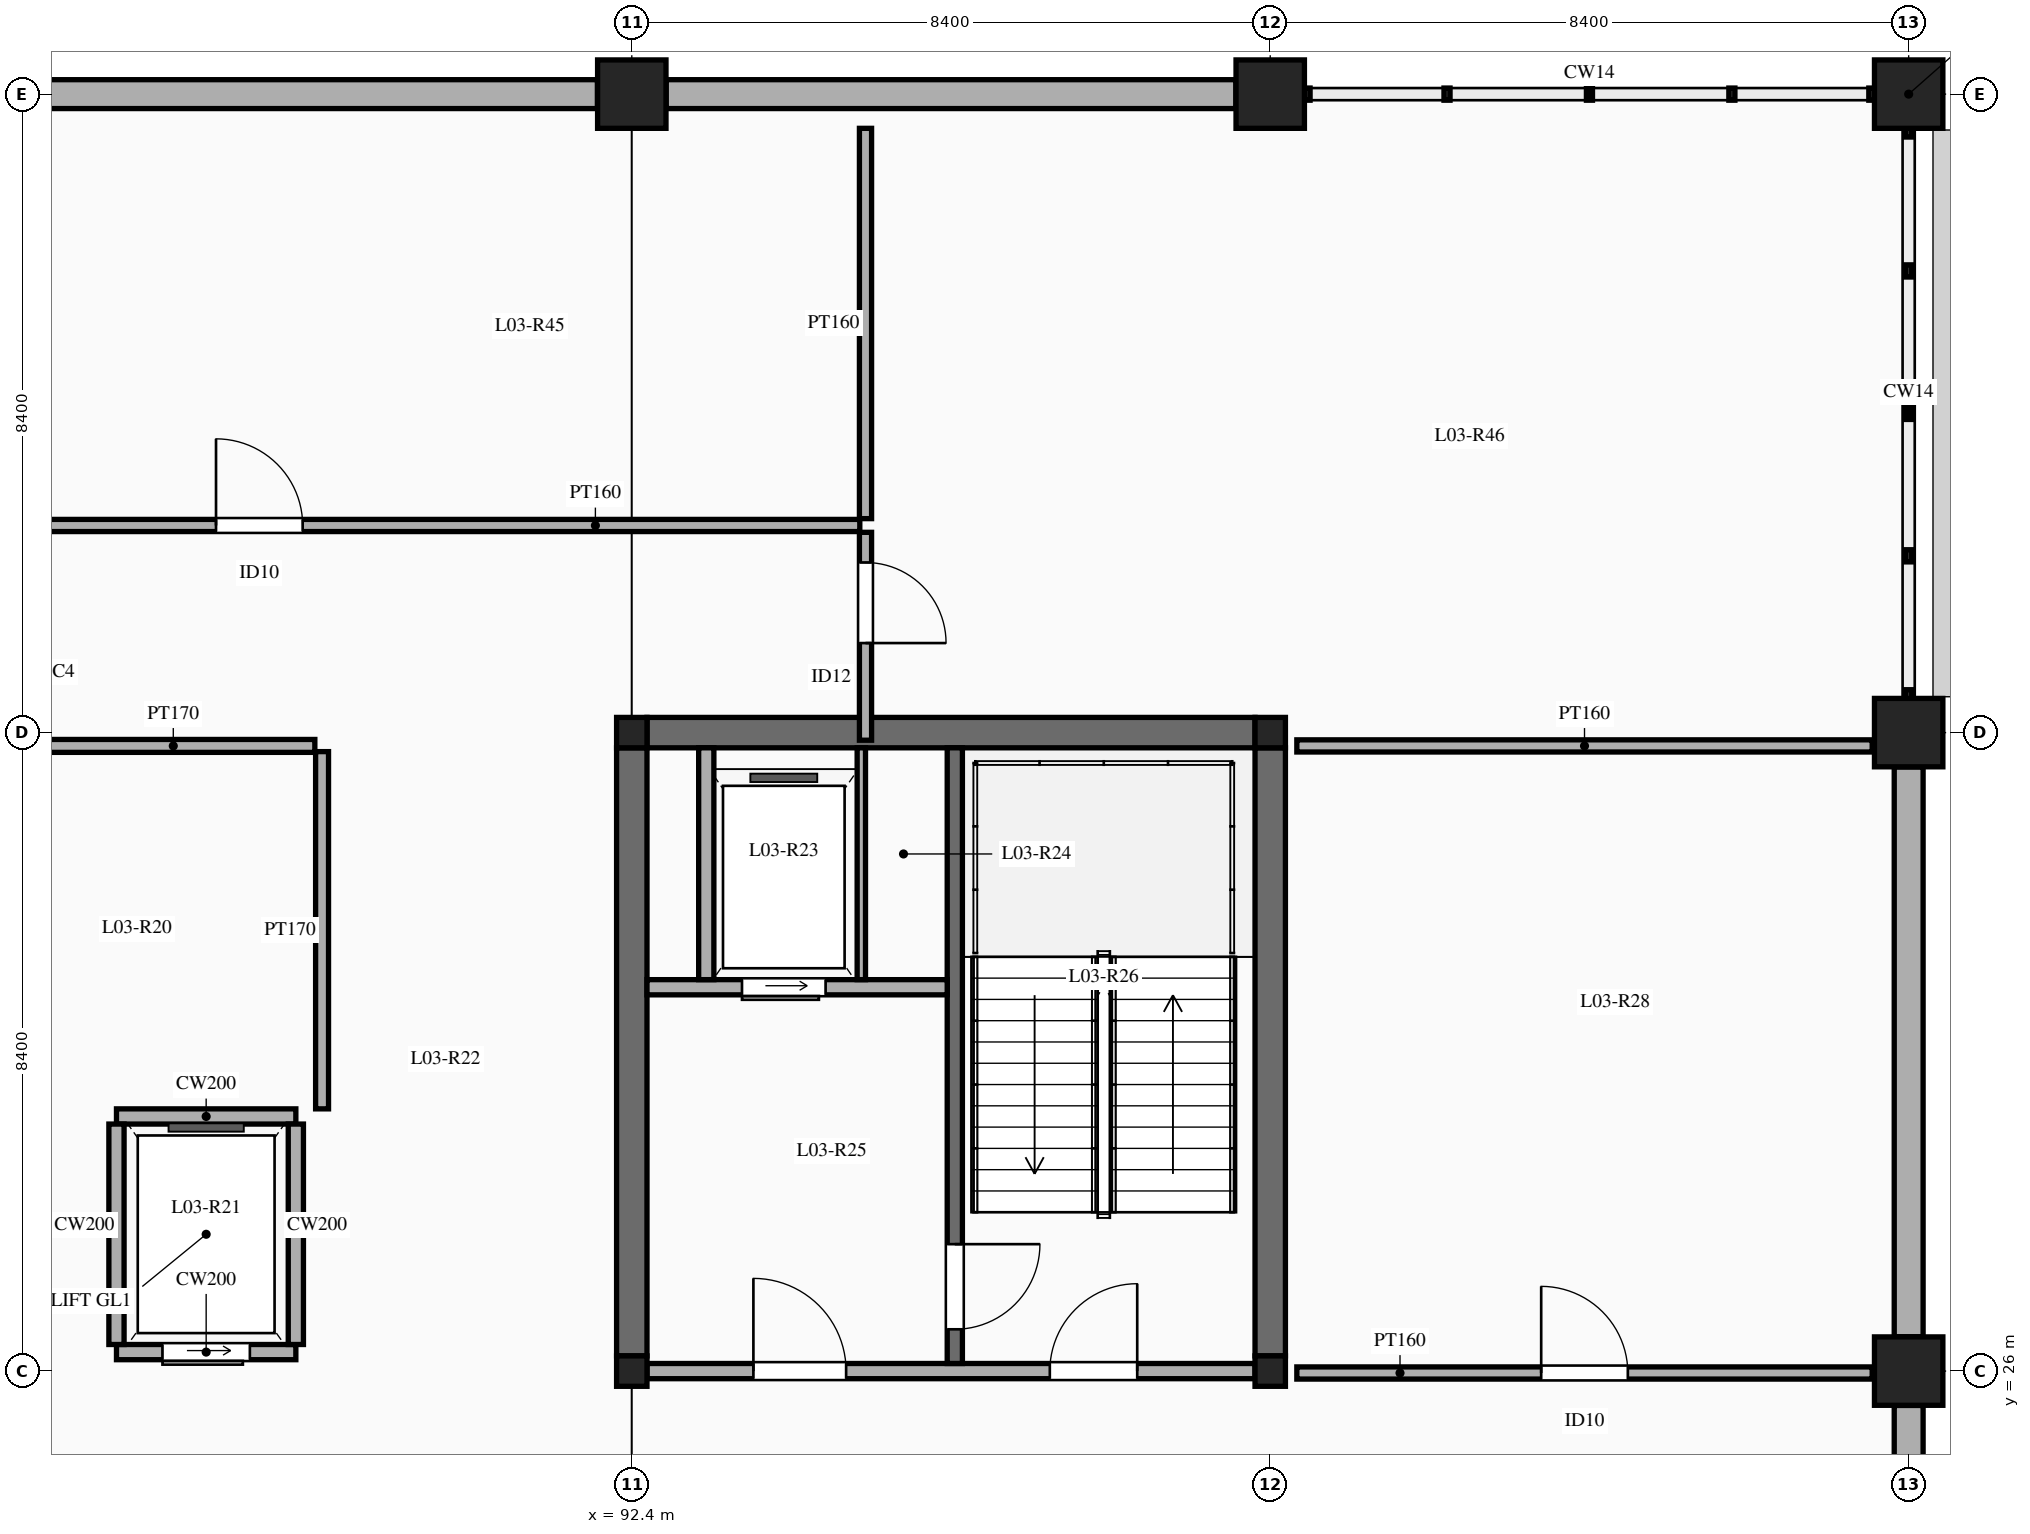
"""IFC4 building model, lengths in metres.
Left out: names, types, materials, properties, quantities, classifications, styles, units other than length and angle.
Written with IfcOpenShell. Run it as: python <this file> out.ifc"""

import sys

from ifc_helpers import new_model, si_unit, direction, frame, frame_2d, origin, origin_2d, place, context, subcontext, project, spatial, rectangle, extrude, element, fill, save


model = new_model("IFC4")
c1 = context("Model", 3, precision=1e-05, world=origin(), true_north=direction((0.0, 1.0)))
c2 = subcontext(c1, "Body", "Model", "MODEL_VIEW")
j1 = project(units=[si_unit("LENGTHUNIT", "METRE"), si_unit("PLANEANGLEUNIT", "RADIAN")], contexts=[c1])
p1 = place(None, origin())
s1 = spatial("IfcSite", under=j1, at=p1, CompositionType="ELEMENT")
p2 = place(p1, origin())
s2 = spatial("IfcBuilding", under=s1, at=p2, CompositionType="ELEMENT")
p3 = place(p2, frame((0.0, 0.0, 15.0)))
s3 = spatial("IfcBuildingStorey", under=s2, at=p3, CompositionType="ELEMENT", Elevation=15.0)
for number, where, z_axis, x_axis in (
    (1, (92.4, 26.0, 0.0), (0.0, 0.0, 1.0), (1.0, 0.0, 0.0)),
    (2, (92.4, 34.4, 0.0), (0.0, 0.0, 1.0), (1.0, 0.0, 0.0)),
):
    element("IfcColumn", number, at=place(p3, frame(where, z_axis=z_axis, x_axis=x_axis)), inside=s3, PredefinedType="COLUMN", context=c2, shape_type="SweptSolid", body=[
        extrude(rectangle(XDim=0.4, YDim=0.4, at=origin_2d()), origin(), (0.0, 0.0, 1.0), 4.5),
    ])
p4 = place(p3, frame((92.4, 42.8, 0.0), z_axis=(0.0, 0.0, 1.0), x_axis=(1.0, 0.0, 0.0)))
e3 = element("IfcColumn", 3, at=p4, inside=s3, PredefinedType="COLUMN", context=c2, shape_type="SweptSolid", body=[
    extrude(rectangle(XDim=0.9, YDim=0.9, at=origin_2d()), origin(), (0.0, 0.0, 1.0), 4.5),
])
for number, where, z_axis, x_axis in (
    (4, (100.8, 26.0, 0.0), (0.0, 0.0, 1.0), (1.0, 0.0, 0.0)),
    (5, (100.8, 34.4, 0.0), (0.0, 0.0, 1.0), (1.0, 0.0, 0.0)),
):
    element("IfcColumn", number, at=place(p3, frame(where, z_axis=z_axis, x_axis=x_axis)), inside=s3, PredefinedType="COLUMN", context=c2, shape_type="SweptSolid", body=[
        extrude(rectangle(XDim=0.4, YDim=0.4, at=origin_2d()), origin(), (0.0, 0.0, 1.0), 4.5),
    ])
for number, where, z_axis, x_axis in (
    (6, (100.8, 42.8, 0.0), (0.0, 0.0, 1.0), (1.0, 0.0, 0.0)),
    (7, (109.2, 26.0, 0.0), (0.0, 0.0, 1.0), (1.0, 0.0, 0.0)),
    (8, (109.2, 34.4, 0.0), (0.0, 0.0, 1.0), (1.0, 0.0, 0.0)),
    (9, (109.2, 42.8, 0.0), (0.0, 0.0, 1.0), (1.0, 0.0, 0.0)),
):
    element("IfcColumn", number, at=place(p3, frame(where, z_axis=z_axis, x_axis=x_axis)), inside=s3, PredefinedType="COLUMN", context=c2, shape_type="SweptSolid", body=[
        extrude(rectangle(XDim=0.9, YDim=0.9, at=origin_2d()), origin(), (0.0, 0.0, 1.0), 4.5),
    ])
for number, where, z_axis, x_axis in (
    (10, (92.4, 26.2, 0.0), (0.0, 0.0, 1.0), (0.0, 1.0, 0.0)),
    (11, (100.8, 26.2, 0.0), (0.0, 0.0, 1.0), (0.0, 1.0, 0.0)),
    (12, (92.6, 34.4, 0.0), (0.0, 0.0, 1.0), (1.0, 0.0, 0.0)),
):
    element("IfcWall", number, at=place(p3, frame(where, z_axis=z_axis, x_axis=x_axis)), inside=s3, PredefinedType="SHEAR", context=c2, shape_type="SweptSolid", body=[
        extrude(rectangle(XDim=8.0, YDim=0.4, at=frame_2d((4.0, 0.0))), origin(), (0.0, 0.0, 1.0), 4.5),
    ])
p5 = place(p3, frame((84.452, 42.8, 0.0), z_axis=(0.0, 0.0, 1.0), x_axis=(1.0, 0.0, 0.0)))
e13 = element("IfcWall", 13, at=p5, inside=s3, PredefinedType="SOLIDWALL", context=c2, shape_type="SweptSolid", body=[
    extrude(rectangle(XDim=7.496, YDim=0.38, at=frame_2d((3.748, 0.0))), origin(), (0.0, 0.0, 1.0), 3.55),
])
p6 = place(p3, frame((92.852, 42.8, 0.0), z_axis=(0.0, 0.0, 1.0), x_axis=(1.0, 0.0, 0.0)))
e14 = element("IfcWall", 14, at=p6, inside=s3, PredefinedType="SOLIDWALL", context=c2, shape_type="SweptSolid", body=[
    extrude(rectangle(XDim=7.496, YDim=0.38, at=frame_2d((3.748, 0.0))), origin(), (0.0, 0.0, 1.0), 3.55),
])
for number, where, z_axis, x_axis in (
    (15, (109.2, 18.052, 0.0), (0.0, 0.0, 1.0), (0.0, 1.0, 0.0)),
    (16, (109.2, 26.452, 0.0), (0.0, 0.0, 1.0), (0.0, 1.0, 0.0)),
):
    element("IfcWall", number, at=place(p3, frame(where, z_axis=z_axis, x_axis=x_axis)), inside=s3, PredefinedType="SOLIDWALL", context=c2, shape_type="SweptSolid", body=[
        extrude(rectangle(XDim=7.496, YDim=0.38, at=frame_2d((3.748, 0.0))), origin(), (0.0, 0.0, 1.0), 3.55),
    ])
p7 = place(p3, frame((92.6, 26.0, 0.0), z_axis=(0.0, 0.0, 1.0), x_axis=(1.0, 0.0, 0.0)))
e17 = element("IfcWall", 17, at=p7, inside=s3, PredefinedType="SOLIDWALL", context=c2, shape_type="SweptSolid", body=[
    extrude(rectangle(XDim=8.0, YDim=0.2, at=frame_2d((4.0, 0.0))), origin(), (0.0, 0.0, 1.0), 3.48),
])
p8 = place(p7, frame((1.4, 0.0, 0.0)))
e18 = element("IfcOpeningElement", 18, at=p8, cuts=e17, PredefinedType="OPENING", context=c2, shape_type="SweptSolid", body=[
    extrude(rectangle(XDim=1.22, YDim=2.15, at=frame_2d((0.61, 1.075))), frame((0.0, 0.11, 0.0), z_axis=(0.0, -1.0, 0.0), x_axis=(1.0, 0.0, 0.0)), (0.0, 0.0, 1.0), 0.22),
])
p9 = place(p7, frame((5.3, 0.0, 0.0)))
e19 = element("IfcOpeningElement", 19, at=p9, cuts=e17, PredefinedType="OPENING", context=c2, shape_type="SweptSolid", body=[
    extrude(rectangle(XDim=1.15, YDim=2.15, at=frame_2d((0.575, 1.075))), frame((0.0, 0.11, 0.0), z_axis=(0.0, -1.0, 0.0), x_axis=(1.0, 0.0, 0.0)), (0.0, 0.0, 1.0), 0.22),
])
p10 = place(p3, frame((96.65, 26.1, 0.0), z_axis=(0.0, 0.0, 1.0), x_axis=(0.0, 1.0, 0.0)))
e20 = element("IfcWall", 20, at=p10, inside=s3, PredefinedType="SOLIDWALL", context=c2, shape_type="SweptSolid", body=[
    extrude(rectangle(XDim=8.1, YDim=0.2, at=frame_2d((4.05, 0.0))), origin(), (0.0, 0.0, 1.0), 4.25),
])
p11 = place(p10, frame((0.45, 0.0, 0.0)))
e21 = element("IfcOpeningElement", 21, at=p11, cuts=e20, PredefinedType="OPENING", context=c2, shape_type="SweptSolid", body=[
    extrude(rectangle(XDim=1.12, YDim=2.15, at=frame_2d((0.56, 1.075))), frame((0.0, 0.11, 0.0), z_axis=(0.0, -1.0, 0.0), x_axis=(1.0, 0.0, 0.0)), (0.0, 0.0, 1.0), 0.22),
])
p12 = place(p3, frame((92.6, 31.05, 0.0), z_axis=(0.0, 0.0, 1.0), x_axis=(1.0, 0.0, 0.0)))
e22 = element("IfcWall", 22, at=p12, inside=s3, PredefinedType="SOLIDWALL", context=c2, shape_type="SweptSolid", body=[
    extrude(rectangle(XDim=3.95, YDim=0.2, at=frame_2d((1.975, 0.0))), origin(), (0.0, 0.0, 1.0), 4.25),
])
p13 = place(p12, frame((1.25, 0.0, 0.0)))
e23 = element("IfcOpeningElement", 23, at=p13, cuts=e22, PredefinedType="OPENING", context=c2, shape_type="SweptSolid", body=[
    extrude(rectangle(XDim=1.1, YDim=2.15, at=frame_2d((0.55, 1.075))), frame((0.0, 0.11, 0.0), z_axis=(0.0, -1.0, 0.0), x_axis=(1.0, 0.0, 0.0)), (0.0, 0.0, 1.0), 0.22),
])
p14 = place(p3, frame((95.42, 31.15, 0.0), z_axis=(0.0, 0.0, 1.0), x_axis=(0.0, 1.0, 0.0)))
e24 = element("IfcWall", 24, at=p14, inside=s3, PredefinedType="PARTITIONING", context=c2, shape_type="SweptSolid", body=[
    extrude(rectangle(XDim=3.05, YDim=0.11, at=frame_2d((1.525, 0.0))), origin(), (0.0, 0.0, 1.0), 4.25),
])
p15 = place(p3, frame((93.38, 31.15, 0.0), z_axis=(0.0, 0.0, 1.0), x_axis=(0.0, 1.0, 0.0)))
e25 = element("IfcWall", 25, at=p15, inside=s3, PredefinedType="SOLIDWALL", context=c2, shape_type="SweptSolid", body=[
    extrude(rectangle(XDim=3.05, YDim=0.2, at=frame_2d((1.525, 0.0))), origin(), (0.0, 0.0, 1.0), 4.25),
])
p16 = place(p3, frame((85.62, 26.25, 0.0), z_axis=(0.0, 0.0, 1.0), x_axis=(1.0, 0.0, 0.0)))
e26 = element("IfcWall", 26, at=p16, inside=s3, PredefinedType="SOLIDWALL", context=c2, shape_type="SweptSolid", body=[
    extrude(rectangle(XDim=2.36, YDim=0.2, at=frame_2d((1.18, 0.0))), origin(), (0.0, 0.0, 1.0), 3.48),
])
p17 = place(p16, frame((0.605, 0.0, 0.0)))
e27 = element("IfcOpeningElement", 27, at=p17, cuts=e26, PredefinedType="OPENING", context=c2, shape_type="SweptSolid", body=[
    extrude(rectangle(XDim=1.15, YDim=2.2, at=frame_2d((0.575, 1.1))), frame((0.0, 0.11, 0.0), z_axis=(0.0, -1.0, 0.0), x_axis=(1.0, 0.0, 0.0)), (0.0, 0.0, 1.0), 0.22),
])
p18 = place(p3, frame((85.62, 29.35, 0.0), z_axis=(0.0, 0.0, 1.0), x_axis=(1.0, 0.0, 0.0)))
e28 = element("IfcWall", 28, at=p18, inside=s3, PredefinedType="SOLIDWALL", context=c2, shape_type="SweptSolid", body=[
    extrude(rectangle(XDim=2.36, YDim=0.2, at=frame_2d((1.18, 0.0))), origin(), (0.0, 0.0, 1.0), 4.25),
])
p19 = place(p3, frame((85.62, 26.35, 0.0), z_axis=(0.0, 0.0, 1.0), x_axis=(0.0, 1.0, 0.0)))
e29 = element("IfcWall", 29, at=p19, inside=s3, PredefinedType="SOLIDWALL", context=c2, shape_type="SweptSolid", body=[
    extrude(rectangle(XDim=2.9, YDim=0.2, at=frame_2d((1.45, 0.0))), origin(), (0.0, 0.0, 1.0), 4.25),
])
p20 = place(p3, frame((87.98, 26.35, 0.0), z_axis=(0.0, 0.0, 1.0), x_axis=(0.0, 1.0, 0.0)))
e30 = element("IfcWall", 30, at=p20, inside=s3, PredefinedType="SOLIDWALL", context=c2, shape_type="SweptSolid", body=[
    extrude(rectangle(XDim=2.9, YDim=0.2, at=frame_2d((1.45, 0.0))), origin(), (0.0, 0.0, 1.0), 3.83),
])
p21 = place(p3, frame((88.325, 29.45, 0.0), z_axis=(0.0, 0.0, 1.0), x_axis=(0.0, 1.0, 0.0)))
e31 = element("IfcWall", 31, at=p21, inside=s3, PredefinedType="PARTITIONING", context=c2, shape_type="SweptSolid", body=[
    extrude(rectangle(XDim=4.7, YDim=0.17, at=frame_2d((2.35, 0.0))), origin(), (0.0, 0.0, 1.0), 3.45),
])
p22 = place(p3, frame((84.505, 34.225, 0.0), z_axis=(0.0, 0.0, 1.0), x_axis=(1.0, 0.0, 0.0)))
e32 = element("IfcWall", 32, at=p22, inside=s3, PredefinedType="PARTITIONING", context=c2, shape_type="SweptSolid", body=[
    extrude(rectangle(XDim=3.725, YDim=0.17, at=frame_2d((1.863, 0.0))), origin(), (0.0, 0.0, 1.0), 3.45),
])
p23 = place(p3, frame((101.15, 25.975, 0.0), z_axis=(0.0, 0.0, 1.0), x_axis=(1.0, 0.0, 0.0)))
e33 = element("IfcWall", 33, at=p23, inside=s3, PredefinedType="PARTITIONING", context=c2, shape_type="SweptSolid", body=[
    extrude(rectangle(XDim=7.57, YDim=0.16, at=frame_2d((3.785, 0.0))), origin(), (0.0, 0.0, 1.0), 3.45),
])
p24 = place(p23, frame((3.215, 0.0, 0.0)))
e34 = element("IfcOpeningElement", 34, at=p24, cuts=e33, PredefinedType="OPENING", context=c2, shape_type="SweptSolid", body=[
    extrude(rectangle(XDim=1.14, YDim=2.22, at=frame_2d((0.57, 1.11))), frame((0.0, 0.09, 0.0), z_axis=(0.0, -1.0, 0.0), x_axis=(1.0, 0.0, 0.0)), (0.0, 0.0, 1.0), 0.18),
])
p25 = place(p3, frame((101.15, 34.225, 0.0), z_axis=(0.0, 0.0, 1.0), x_axis=(1.0, 0.0, 0.0)))
e35 = element("IfcWall", 35, at=p25, inside=s3, PredefinedType="PARTITIONING", context=c2, shape_type="SweptSolid", body=[
    extrude(rectangle(XDim=7.57, YDim=0.16, at=frame_2d((3.785, 0.0))), origin(), (0.0, 0.0, 1.0), 3.45),
])
p26 = place(p3, frame((79.75, 37.125, 0.0), z_axis=(0.0, 0.0, 1.0), x_axis=(1.0, 0.0, 0.0)))
e36 = element("IfcWall", 36, at=p26, inside=s3, PredefinedType="PARTITIONING", context=c2, shape_type="SweptSolid", body=[
    extrude(rectangle(XDim=15.65, YDim=0.16, at=frame_2d((7.825, 0.0))), origin(), (0.0, 0.0, 1.0), 3.45),
])
p27 = place(p26, frame((7.18, 0.0, 0.0)))
e37 = element("IfcOpeningElement", 37, at=p27, cuts=e36, PredefinedType="OPENING", context=c2, shape_type="SweptSolid", body=[
    extrude(rectangle(XDim=1.14, YDim=2.22, at=frame_2d((0.57, 1.11))), frame((0.0, 0.09, 0.0), z_axis=(0.0, -1.0, 0.0), x_axis=(1.0, 0.0, 0.0)), (0.0, 0.0, 1.0), 0.18),
])
p28 = place(p3, frame((95.475, 34.3, 0.0), z_axis=(0.0, 0.0, 1.0), x_axis=(0.0, 1.0, 0.0)))
e38 = element("IfcWall", 38, at=p28, inside=s3, PredefinedType="PARTITIONING", context=c2, shape_type="SweptSolid", body=[
    extrude(rectangle(XDim=2.735, YDim=0.16, at=frame_2d((1.367, 0.0))), origin(), (0.0, 0.0, 1.0), 3.45),
])
p29 = place(p28, frame((1.278, 0.0, 0.0)))
e39 = element("IfcOpeningElement", 39, at=p29, cuts=e38, PredefinedType="OPENING", context=c2, shape_type="SweptSolid", body=[
    extrude(rectangle(XDim=1.06, YDim=2.18, at=frame_2d((0.53, 1.09))), frame((0.0, 0.09, 0.0), z_axis=(0.0, -1.0, 0.0), x_axis=(1.0, 0.0, 0.0)), (0.0, 0.0, 1.0), 0.18),
])
p30 = place(p3, frame((95.475, 37.215, 0.0), z_axis=(0.0, 0.0, 1.0), x_axis=(0.0, 1.0, 0.0)))
e40 = element("IfcWall", 40, at=p30, inside=s3, PredefinedType="PARTITIONING", context=c2, shape_type="SweptSolid", body=[
    extrude(rectangle(XDim=5.135, YDim=0.16, at=frame_2d((2.567, 0.0))), origin(), (0.0, 0.0, 1.0), 3.45),
])
p31 = place(p8, origin())
e41 = element("IfcDoor", 41, at=p31, inside=s3, OperationType="SINGLE_SWING_LEFT", PredefinedType="DOOR", context=c2, shape_type="SweptSolid", body=[
    extrude(rectangle(XDim=1.22, YDim=2.15, at=frame_2d((0.61, 1.075))), frame((0.0, 0.025, 0.0), z_axis=(0.0, -1.0, 0.0), x_axis=(1.0, 0.0, 0.0)), (0.0, 0.0, 1.0), 0.05),
])
fill(e18, e41)
p32 = place(p9, origin())
e42 = element("IfcDoor", 42, at=p32, inside=s3, OperationType="SINGLE_SWING_RIGHT", PredefinedType="DOOR", context=c2, shape_type="SweptSolid", body=[
    extrude(rectangle(XDim=1.15, YDim=2.15, at=frame_2d((0.575, 1.075))), frame((0.0, 0.025, 0.0), z_axis=(0.0, -1.0, 0.0), x_axis=(1.0, 0.0, 0.0)), (0.0, 0.0, 1.0), 0.05),
])
fill(e19, e42)
p33 = place(p11, frame((1.12, 0.0, 0.0), z_axis=(0.0, 0.0, 1.0), x_axis=(-1.0, 0.0, 0.0)))
e43 = element("IfcDoor", 43, at=p33, inside=s3, OperationType="SINGLE_SWING_LEFT", PredefinedType="DOOR", context=c2, shape_type="SweptSolid", body=[
    extrude(rectangle(XDim=1.12, YDim=2.15, at=frame_2d((0.56, 1.075))), frame((0.0, 0.025, 0.0), z_axis=(0.0, -1.0, 0.0), x_axis=(1.0, 0.0, 0.0)), (0.0, 0.0, 1.0), 0.05),
])
fill(e21, e43)
p34 = place(p13, frame((1.1, 0.0, 0.0), z_axis=(0.0, 0.0, 1.0), x_axis=(-1.0, 0.0, 0.0)))
e44 = element("IfcDoor", 44, at=p34, inside=s3, OperationType="SLIDING_TO_LEFT", PredefinedType="DOOR", context=c2, shape_type="SweptSolid", body=[
    extrude(rectangle(XDim=1.1, YDim=2.15, at=frame_2d((0.55, 1.075))), frame((0.0, 0.025, 0.0), z_axis=(0.0, -1.0, 0.0), x_axis=(1.0, 0.0, 0.0)), (0.0, 0.0, 1.0), 0.05),
])
fill(e23, e44)
p35 = place(p17, frame((1.15, 0.0, 0.0), z_axis=(0.0, 0.0, 1.0), x_axis=(-1.0, 0.0, 0.0)))
e45 = element("IfcDoor", 45, at=p35, inside=s3, OperationType="SLIDING_TO_LEFT", PredefinedType="DOOR", context=c2, shape_type="SweptSolid", body=[
    extrude(rectangle(XDim=1.15, YDim=2.2, at=frame_2d((0.575, 1.1))), frame((0.0, 0.025, 0.0), z_axis=(0.0, -1.0, 0.0), x_axis=(1.0, 0.0, 0.0)), (0.0, 0.0, 1.0), 0.05),
])
fill(e27, e45)
p36 = place(p24, origin())
e46 = element("IfcDoor", 46, at=p36, inside=s3, OperationType="SINGLE_SWING_LEFT", PredefinedType="DOOR", context=c2, shape_type="SweptSolid", body=[
    extrude(rectangle(XDim=1.14, YDim=2.22, at=frame_2d((0.57, 1.11))), frame((0.0, 0.025, 0.0), z_axis=(0.0, -1.0, 0.0), x_axis=(1.0, 0.0, 0.0)), (0.0, 0.0, 1.0), 0.05),
])
fill(e34, e46)
p37 = place(p27, origin())
e47 = element("IfcDoor", 47, at=p37, inside=s3, OperationType="SINGLE_SWING_LEFT", PredefinedType="DOOR", context=c2, shape_type="SweptSolid", body=[
    extrude(rectangle(XDim=1.14, YDim=2.22, at=frame_2d((0.57, 1.11))), frame((0.0, 0.025, 0.0), z_axis=(0.0, -1.0, 0.0), x_axis=(1.0, 0.0, 0.0)), (0.0, 0.0, 1.0), 0.05),
])
fill(e37, e47)
p38 = place(p29, frame((1.06, 0.0, 0.0), z_axis=(0.0, 0.0, 1.0), x_axis=(-1.0, 0.0, 0.0)))
e48 = element("IfcDoor", 48, at=p38, inside=s3, OperationType="SINGLE_SWING_RIGHT", PredefinedType="DOOR", context=c2, shape_type="SweptSolid", body=[
    extrude(rectangle(XDim=1.06, YDim=2.18, at=frame_2d((0.53, 1.09))), frame((0.0, 0.025, 0.0), z_axis=(0.0, -1.0, 0.0), x_axis=(1.0, 0.0, 0.0)), (0.0, 0.0, 1.0), 0.05),
])
fill(e39, e48)
save(model, sys.argv[1])
